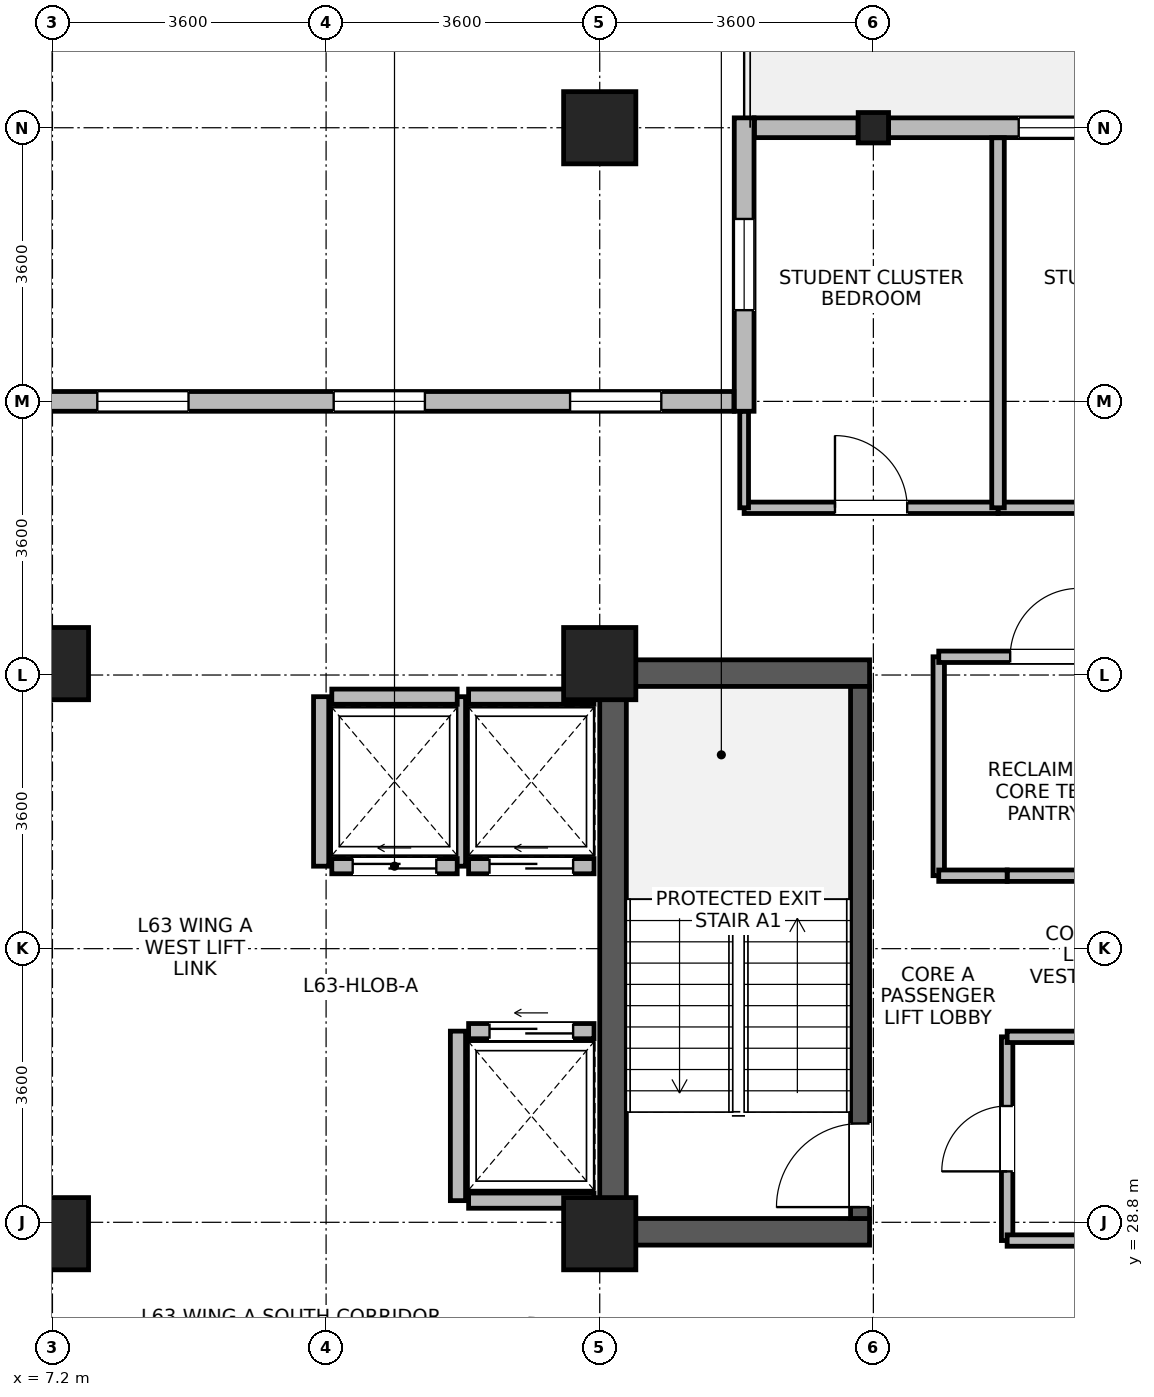
"""IFC4 building model, lengths in metres.
Left out: names, types, materials, properties, quantities, classifications, styles, units other than length and angle.
Written with IfcOpenShell. Run it as: python <this file> out.ifc"""

import sys

from ifc_helpers import new_model, si_unit, direction, frame, frame_2d, origin, origin_2d, place, context, subcontext, project, spatial, rectangle, i_section, extrude, source, transform, mapped, element, fill, save


model = new_model("IFC4")
c1 = context("Model", 3, precision=1e-05, world=origin(), true_north=direction((0.0, 1.0)))
c2 = subcontext(c1, "Body", "Model", "MODEL_VIEW")
j1 = project(units=[si_unit("LENGTHUNIT", "METRE"), si_unit("PLANEANGLEUNIT", "RADIAN")], contexts=[c1])
p1 = place(None, origin())
s1 = spatial("IfcSite", under=j1, at=p1, CompositionType="ELEMENT")
p2 = place(p1, origin())
s2 = spatial("IfcBuilding", under=s1, at=p2, CompositionType="ELEMENT")
p3 = place(p2, frame((0.0, 0.0, 246.2)))
s3 = spatial("IfcBuildingStorey", under=s2, at=p3, CompositionType="ELEMENT", Elevation=246.2)
p4 = place(p3, frame((14.575, 28.5, 0.0), z_axis=(0.0, 0.0, 1.0), x_axis=(0.0, 1.0, 0.0)))
e1 = element("IfcWall", 1, at=p4, inside=s3, PredefinedType="SHEAR", context=c2, shape_type="SweptSolid", body=[
    extrude(rectangle(XDim=7.7, YDim=0.35, at=frame_2d((3.85, 0.0))), origin(), (0.0, 0.0, 1.0), 3.28),
])
for number, where, z_axis, x_axis in (
    (2, (14.75, 28.675, 0.0), (0.0, 0.0, 1.0), (1.0, 0.0, 0.0)),
    (3, (14.75, 36.025, 0.0), (0.0, 0.0, 1.0), (1.0, 0.0, 0.0)),
):
    element("IfcWall", number, at=place(p3, frame(where, z_axis=z_axis, x_axis=x_axis)), inside=s3, PredefinedType="SHEAR", context=c2, shape_type="SweptSolid", body=[
        extrude(rectangle(XDim=3.2, YDim=0.35, at=frame_2d((1.6, 0.0))), origin(), (0.0, 0.0, 1.0), 3.28),
    ])
p5 = place(p3, frame((17.825, 28.85, 0.0), z_axis=(0.0, 0.0, 1.0), x_axis=(0.0, 1.0, 0.0)))
e4 = element("IfcWall", 4, at=p5, inside=s3, PredefinedType="SHEAR", context=c2, shape_type="SweptSolid", body=[
    extrude(rectangle(XDim=7.0, YDim=0.25, at=frame_2d((3.5, 0.0))), origin(), (0.0, 0.0, 1.0), 3.28),
])
p6 = place(p5, frame((0.15, 0.0, 0.0)))
e5 = element("IfcOpeningElement", 5, at=p6, cuts=e4, PredefinedType="OPENING", context=c2, shape_type="SweptSolid", body=[
    extrude(rectangle(XDim=1.1, YDim=2.08, at=frame_2d((0.55, 1.04))), frame((0.0, 0.135, 0.0), z_axis=(0.0, -1.0, 0.0), x_axis=(1.0, 0.0, 0.0)), (0.0, 0.0, 1.0), 0.27),
])
m1 = source(origin(), c2, "Body", "SweptSolid", [
    extrude(rectangle(XDim=0.95, YDim=0.95, at=origin_2d()), origin(), (0.0, 0.0, 1.0), 3.7),
])
for number, where, z_axis, x_axis in (
    (6, (7.2, 28.65, 0.0), (0.0, 0.0, 1.0), (1.0, 0.0, 0.0)),
    (7, (7.2, 36.15, 0.0), (0.0, 0.0, 1.0), (1.0, 0.0, 0.0)),
    (8, (14.4, 28.65, 0.0), (0.0, 0.0, 1.0), (1.0, 0.0, 0.0)),
    (9, (14.4, 36.15, 0.0), (0.0, 0.0, 1.0), (1.0, 0.0, 0.0)),
    (10, (14.4, 43.2, 0.0), (0.0, 0.0, 1.0), (1.0, 0.0, 0.0)),
):
    element("IfcColumn", number, at=place(p3, frame(where, z_axis=z_axis, x_axis=x_axis)), inside=s3, PredefinedType="COLUMN", context=c2, shape_type="MappedRepresentation", body=[
        mapped(m1, transform((0.0, 0.0, 0.0), x_axis=(1.0, 0.0, 0.0), y_axis=(0.0, 1.0, 0.0), z_axis=(0.0, 0.0, 1.0), scale=1.0)),
    ])
m2 = source(origin(), c2, "Body", "SweptSolid", [
    extrude(i_section(OverallWidth=0.399, OverallDepth=0.4, WebThickness=0.017, FlangeThickness=0.023, FilletRadius=0.015, at=origin_2d()), origin(), (0.0, 0.0, 1.0), 3.7),
])
p7 = place(p3, frame((18.0, 43.2, 0.0), z_axis=(0.0, 0.0, 1.0), x_axis=(1.0, 0.0, 0.0)))
e11 = element("IfcColumn", 11, at=p7, inside=s3, PredefinedType="COLUMN", context=c2, shape_type="MappedRepresentation", body=[
    mapped(m2, transform((0.0, 0.0, 0.0), x_axis=(1.0, 0.0, 0.0), y_axis=(0.0, 1.0, 0.0), z_axis=(0.0, 0.0, 1.0), scale=1.0)),
])
p8 = place(p3, frame((18.2, 43.2, 0.0), z_axis=(0.0, 0.0, 1.0), x_axis=(1.0, 0.0, 0.0)))
e12 = element("IfcWall", 12, at=p8, inside=s3, PredefinedType="STANDARD", context=c2, shape_type="SweptSolid", body=[
    extrude(rectangle(XDim=2.924, YDim=0.26, at=frame_2d((1.462, 0.0))), origin(), (0.0, 0.0, 1.0), 2.86),
])
p9 = place(p8, frame((1.712, 0.0, 0.85)))
e13 = element("IfcOpeningElement", 13, at=p9, cuts=e12, PredefinedType="OPENING", context=c2, shape_type="SweptSolid", body=[
    extrude(rectangle(XDim=0.95, YDim=1.75, at=frame_2d((0.475, 0.875))), frame((0.0, 0.14, 0.0), z_axis=(0.0, -1.0, 0.0), x_axis=(1.0, 0.0, 0.0)), (0.0, 0.0, 1.0), 0.28),
])
p10 = place(p3, frame((16.435, 43.2, 0.0), z_axis=(0.0, 0.0, 1.0), x_axis=(1.0, 0.0, 0.0)))
e14 = element("IfcWall", 14, at=p10, inside=s3, PredefinedType="STANDARD", context=c2, shape_type="SweptSolid", body=[
    extrude(rectangle(XDim=1.365, YDim=0.26, at=frame_2d((0.682, 0.0))), origin(), (0.0, 0.0, 1.0), 2.86),
])
p11 = place(p3, frame((16.3, 39.47, 0.0), z_axis=(0.0, 0.0, 1.0), x_axis=(0.0, 1.0, 0.0)))
e15 = element("IfcWall", 15, at=p11, inside=s3, PredefinedType="STANDARD", context=c2, shape_type="SweptSolid", body=[
    extrude(rectangle(XDim=3.86, YDim=0.26, at=frame_2d((1.93, 0.0))), origin(), (0.0, 0.0, 1.0), 3.26),
])
p12 = place(p11, frame((1.33, 0.0, 0.85)))
e16 = element("IfcOpeningElement", 16, at=p12, cuts=e15, PredefinedType="OPENING", context=c2, shape_type="SweptSolid", body=[
    extrude(rectangle(XDim=1.2, YDim=1.75, at=frame_2d((0.6, 0.875))), frame((0.0, 0.14, 0.0), z_axis=(0.0, -1.0, 0.0), x_axis=(1.0, 0.0, 0.0)), (0.0, 0.0, 1.0), 0.28),
])
p13 = place(p3, frame((6.835, 39.6, 0.0), z_axis=(0.0, 0.0, 1.0), x_axis=(1.0, 0.0, 0.0)))
e17 = element("IfcWall", 17, at=p13, inside=s3, PredefinedType="STANDARD", context=c2, shape_type="SweptSolid", body=[
    extrude(rectangle(XDim=9.33, YDim=0.26, at=frame_2d((4.665, 0.0))), origin(), (0.0, 0.0, 1.0), 3.26),
])
p14 = place(p13, frame((0.955, 0.0, 0.85)))
e18 = element("IfcOpeningElement", 18, at=p14, cuts=e17, PredefinedType="OPENING", context=c2, shape_type="SweptSolid", body=[
    extrude(rectangle(XDim=1.2, YDim=1.75, at=frame_2d((0.6, 0.875))), frame((0.0, 0.14, 0.0), z_axis=(0.0, -1.0, 0.0), x_axis=(1.0, 0.0, 0.0)), (0.0, 0.0, 1.0), 0.28),
])
p15 = place(p13, frame((4.065, 0.0, 0.85)))
e19 = element("IfcOpeningElement", 19, at=p15, cuts=e17, PredefinedType="OPENING", context=c2, shape_type="SweptSolid", body=[
    extrude(rectangle(XDim=1.2, YDim=1.75, at=frame_2d((0.6, 0.875))), frame((0.0, 0.14, 0.0), z_axis=(0.0, -1.0, 0.0), x_axis=(1.0, 0.0, 0.0)), (0.0, 0.0, 1.0), 0.28),
])
p16 = place(p13, frame((7.175, 0.0, 0.85)))
e20 = element("IfcOpeningElement", 20, at=p16, cuts=e17, PredefinedType="OPENING", context=c2, shape_type="SweptSolid", body=[
    extrude(rectangle(XDim=1.2, YDim=1.75, at=frame_2d((0.6, 0.875))), frame((0.0, 0.14, 0.0), z_axis=(0.0, -1.0, 0.0), x_axis=(1.0, 0.0, 0.0)), (0.0, 0.0, 1.0), 0.28),
])
p17 = place(p3, frame((12.675, 33.485, 0.0), z_axis=(0.0, 0.0, 1.0), x_axis=(1.0, 0.0, 0.0)))
e21 = element("IfcWall", 21, at=p17, inside=s3, PredefinedType="PARTITIONING", context=c2, shape_type="SweptSolid", body=[
    extrude(rectangle(XDim=1.65, YDim=0.2, at=frame_2d((0.825, 0.0))), origin(), (0.0, 0.0, 1.0), 3.26),
])
p18 = place(p17, frame((0.275, 0.0, 0.0)))
e22 = element("IfcOpeningElement", 22, at=p18, cuts=e21, PredefinedType="OPENING", context=c2, shape_type="SweptSolid", body=[
    extrude(rectangle(XDim=1.1, YDim=2.12, at=frame_2d((0.55, 1.06))), frame((0.0, 0.11, 0.0), z_axis=(0.0, -1.0, 0.0), x_axis=(1.0, 0.0, 0.0)), (0.0, 0.0, 1.0), 0.22),
])
p19 = place(p3, frame((12.675, 35.715, 0.0), z_axis=(0.0, 0.0, 1.0), x_axis=(1.0, 0.0, 0.0)))
e23 = element("IfcWall", 23, at=p19, inside=s3, PredefinedType="PARTITIONING", context=c2, shape_type="SweptSolid", body=[
    extrude(rectangle(XDim=1.65, YDim=0.2, at=frame_2d((0.825, 0.0))), origin(), (0.0, 0.0, 1.0), 1.46),
])
p20 = place(p3, frame((12.535, 33.485, 0.0), z_axis=(0.0, 0.0, 1.0), x_axis=(0.0, 1.0, 0.0)))
e24 = element("IfcWall", 24, at=p20, inside=s3, PredefinedType="PARTITIONING", context=c2, shape_type="SweptSolid", body=[
    extrude(rectangle(XDim=2.23, YDim=0.2, at=frame_2d((1.115, 0.0))), origin(), (0.0, 0.0, 1.0), 3.26),
])
p21 = place(p3, frame((12.675, 29.085, 0.0), z_axis=(0.0, 0.0, 1.0), x_axis=(1.0, 0.0, 0.0)))
e25 = element("IfcWall", 25, at=p21, inside=s3, PredefinedType="PARTITIONING", context=c2, shape_type="SweptSolid", body=[
    extrude(rectangle(XDim=1.65, YDim=0.2, at=frame_2d((0.825, 0.0))), origin(), (0.0, 0.0, 1.0), 1.46),
])
p22 = place(p3, frame((12.675, 31.315, 0.0), z_axis=(0.0, 0.0, 1.0), x_axis=(1.0, 0.0, 0.0)))
e26 = element("IfcWall", 26, at=p22, inside=s3, PredefinedType="PARTITIONING", context=c2, shape_type="SweptSolid", body=[
    extrude(rectangle(XDim=1.65, YDim=0.2, at=frame_2d((0.825, 0.0))), origin(), (0.0, 0.0, 1.0), 3.26),
])
p23 = place(p22, frame((0.275, 0.0, 0.0)))
e27 = element("IfcOpeningElement", 27, at=p23, cuts=e26, PredefinedType="OPENING", context=c2, shape_type="SweptSolid", body=[
    extrude(rectangle(XDim=1.1, YDim=2.12, at=frame_2d((0.55, 1.06))), frame((0.0, 0.11, 0.0), z_axis=(0.0, -1.0, 0.0), x_axis=(1.0, 0.0, 0.0)), (0.0, 0.0, 1.0), 0.22),
])
p24 = place(p3, frame((12.535, 29.085, 0.0), z_axis=(0.0, 0.0, 1.0), x_axis=(0.0, 1.0, 0.0)))
e28 = element("IfcWall", 28, at=p24, inside=s3, PredefinedType="PARTITIONING", context=c2, shape_type="SweptSolid", body=[
    extrude(rectangle(XDim=2.23, YDim=0.2, at=frame_2d((1.115, 0.0))), origin(), (0.0, 0.0, 1.0), 3.26),
])
p25 = place(p3, frame((10.875, 33.485, 0.0), z_axis=(0.0, 0.0, 1.0), x_axis=(1.0, 0.0, 0.0)))
e29 = element("IfcWall", 29, at=p25, inside=s3, PredefinedType="PARTITIONING", context=c2, shape_type="SweptSolid", body=[
    extrude(rectangle(XDim=1.65, YDim=0.2, at=frame_2d((0.825, 0.0))), origin(), (0.0, 0.0, 1.0), 3.26),
])
p26 = place(p25, frame((0.275, 0.0, 0.0)))
e30 = element("IfcOpeningElement", 30, at=p26, cuts=e29, PredefinedType="OPENING", context=c2, shape_type="SweptSolid", body=[
    extrude(rectangle(XDim=1.1, YDim=2.12, at=frame_2d((0.55, 1.06))), frame((0.0, 0.11, 0.0), z_axis=(0.0, -1.0, 0.0), x_axis=(1.0, 0.0, 0.0)), (0.0, 0.0, 1.0), 0.22),
])
p27 = place(p3, frame((10.875, 35.715, 0.0), z_axis=(0.0, 0.0, 1.0), x_axis=(1.0, 0.0, 0.0)))
e31 = element("IfcWall", 31, at=p27, inside=s3, PredefinedType="PARTITIONING", context=c2, shape_type="SweptSolid", body=[
    extrude(rectangle(XDim=1.65, YDim=0.2, at=frame_2d((0.825, 0.0))), origin(), (0.0, 0.0, 1.0), 1.46),
])
p28 = place(p3, frame((10.735, 33.485, 0.0), z_axis=(0.0, 0.0, 1.0), x_axis=(0.0, 1.0, 0.0)))
e32 = element("IfcWall", 32, at=p28, inside=s3, PredefinedType="PARTITIONING", context=c2, shape_type="SweptSolid", body=[
    extrude(rectangle(XDim=2.23, YDim=0.2, at=frame_2d((1.115, 0.0))), origin(), (0.0, 0.0, 1.0), 3.26),
])
p29 = place(p3, frame((19.64, 38.2, 0.0), z_axis=(0.0, 0.0, 1.0), x_axis=(1.0, 0.0, 0.0)))
e33 = element("IfcWall", 33, at=p29, inside=s3, PredefinedType="PARTITIONING", context=c2, shape_type="SweptSolid", body=[
    extrude(rectangle(XDim=3.62, YDim=0.15, at=frame_2d((1.81, 0.0))), origin(), (0.0, 0.0, 1.0), 3.26),
])
p30 = place(p29, frame((1.335, 0.0, 0.0)))
e34 = element("IfcOpeningElement", 34, at=p30, cuts=e33, PredefinedType="OPENING", context=c2, shape_type="SweptSolid", body=[
    extrude(rectangle(XDim=0.95, YDim=2.1, at=frame_2d((0.475, 1.05))), frame((0.0, 0.085, 0.0), z_axis=(0.0, -1.0, 0.0), x_axis=(1.0, 0.0, 0.0)), (0.0, 0.0, 1.0), 0.17),
])
p31 = place(p3, frame((16.3, 38.2, 0.0), z_axis=(0.0, 0.0, 1.0), x_axis=(1.0, 0.0, 0.0)))
e35 = element("IfcWall", 35, at=p31, inside=s3, PredefinedType="PARTITIONING", context=c2, shape_type="SweptSolid", body=[
    extrude(rectangle(XDim=3.34, YDim=0.15, at=frame_2d((1.67, 0.0))), origin(), (0.0, 0.0, 1.0), 3.26),
])
p32 = place(p31, frame((1.195, 0.0, 0.0)))
e36 = element("IfcOpeningElement", 36, at=p32, cuts=e35, PredefinedType="OPENING", context=c2, shape_type="SweptSolid", body=[
    extrude(rectangle(XDim=0.95, YDim=2.1, at=frame_2d((0.475, 1.05))), frame((0.0, 0.085, 0.0), z_axis=(0.0, -1.0, 0.0), x_axis=(1.0, 0.0, 0.0)), (0.0, 0.0, 1.0), 0.17),
])
p33 = place(p3, frame((18.86, 33.36, 0.0), z_axis=(0.0, 0.0, 1.0), x_axis=(0.0, 1.0, 0.0)))
e37 = element("IfcWall", 37, at=p33, inside=s3, PredefinedType="PARTITIONING", context=c2, shape_type="SweptSolid", body=[
    extrude(rectangle(XDim=2.88, YDim=0.15, at=frame_2d((1.44, 0.0))), origin(), (0.0, 0.0, 1.0), 3.26),
])
p34 = place(p3, frame((18.86, 36.24, 0.0), z_axis=(0.0, 0.0, 1.0), x_axis=(1.0, 0.0, 0.0)))
e38 = element("IfcWall", 38, at=p34, inside=s3, PredefinedType="PARTITIONING", context=c2, shape_type="SweptSolid", body=[
    extrude(rectangle(XDim=2.78, YDim=0.15, at=frame_2d((1.39, 0.0))), origin(), (0.0, 0.0, 1.0), 2.36),
])
p35 = place(p34, frame((0.94, 0.0, 0.0)))
e39 = element("IfcOpeningElement", 39, at=p35, cuts=e38, PredefinedType="OPENING", context=c2, shape_type="SweptSolid", body=[
    extrude(rectangle(XDim=0.9, YDim=2.08, at=frame_2d((0.45, 1.04))), frame((0.0, 0.085, 0.0), z_axis=(0.0, -1.0, 0.0), x_axis=(1.0, 0.0, 0.0)), (0.0, 0.0, 1.0), 0.17),
])
p36 = place(p3, frame((19.76, 28.56, 0.0), z_axis=(0.0, 0.0, 1.0), x_axis=(0.0, 1.0, 0.0)))
e40 = element("IfcWall", 40, at=p36, inside=s3, PredefinedType="PARTITIONING", context=c2, shape_type="SweptSolid", body=[
    extrude(rectangle(XDim=2.68, YDim=0.15, at=frame_2d((1.34, 0.0))), origin(), (0.0, 0.0, 1.0), 3.26),
])
p37 = place(p36, frame((0.91, 0.0, 0.0)))
e41 = element("IfcOpeningElement", 41, at=p37, cuts=e40, PredefinedType="OPENING", context=c2, shape_type="SweptSolid", body=[
    extrude(rectangle(XDim=0.86, YDim=2.02, at=frame_2d((0.43, 1.01))), frame((0.0, 0.085, 0.0), z_axis=(0.0, -1.0, 0.0), x_axis=(1.0, 0.0, 0.0)), (0.0, 0.0, 1.0), 0.17),
])
p38 = place(p3, frame((19.76, 28.56, 0.0), z_axis=(0.0, 0.0, 1.0), x_axis=(1.0, 0.0, 0.0)))
e42 = element("IfcWall", 42, at=p38, inside=s3, PredefinedType="PARTITIONING", context=c2, shape_type="SweptSolid", body=[
    extrude(rectangle(XDim=2.0, YDim=0.15, at=frame_2d((1.0, 0.0))), origin(), (0.0, 0.0, 1.0), 2.36),
])
p39 = place(p3, frame((19.76, 31.24, 0.0), z_axis=(0.0, 0.0, 1.0), x_axis=(1.0, 0.0, 0.0)))
e43 = element("IfcWall", 43, at=p39, inside=s3, PredefinedType="PARTITIONING", context=c2, shape_type="SweptSolid", body=[
    extrude(rectangle(XDim=2.0, YDim=0.15, at=frame_2d((1.0, 0.0))), origin(), (0.0, 0.0, 1.0), 3.26),
])
p40 = place(p3, frame((19.76, 33.36, 0.0), z_axis=(0.0, 0.0, 1.0), x_axis=(1.0, 0.0, 0.0)))
e44 = element("IfcWall", 44, at=p40, inside=s3, PredefinedType="PARTITIONING", context=c2, shape_type="SweptSolid", body=[
    extrude(rectangle(XDim=1.85, YDim=0.15, at=frame_2d((0.925, 0.0))), origin(), (0.0, 0.0, 1.0), 3.26),
])
p41 = place(p3, frame((18.86, 33.36, 0.0), z_axis=(0.0, 0.0, 1.0), x_axis=(1.0, 0.0, 0.0)))
e45 = element("IfcWall", 45, at=p41, inside=s3, PredefinedType="PARTITIONING", context=c2, shape_type="SweptSolid", body=[
    extrude(rectangle(XDim=0.9, YDim=0.15, at=frame_2d((0.45, 0.0))), origin(), (0.0, 0.0, 1.0), 3.26),
])
p42 = place(p3, frame((16.3, 38.2, 0.0), z_axis=(0.0, 0.0, 1.0), x_axis=(0.0, 1.0, 0.0)))
e46 = element("IfcWall", 46, at=p42, inside=s3, PredefinedType="PARTITIONING", context=c2, shape_type="SweptSolid", body=[
    extrude(rectangle(XDim=1.268, YDim=0.115, at=frame_2d((0.634, 0.0))), origin(), (0.0, 0.0, 1.0), 3.26),
])
p43 = place(p3, frame((19.64, 38.2, 0.0), z_axis=(0.0, 0.0, 1.0), x_axis=(0.0, 1.0, 0.0)))
e47 = element("IfcWall", 47, at=p43, inside=s3, PredefinedType="PARTITIONING", context=c2, shape_type="SweptSolid", body=[
    extrude(rectangle(XDim=4.868, YDim=0.165, at=frame_2d((2.434, 0.0))), origin(), (0.0, 0.0, 1.0), 3.26),
])
p44 = place(p9, origin())
e48 = element("IfcWindow", 48, at=p44, inside=s3, PartitioningType="SINGLE_PANEL", PredefinedType="WINDOW", context=c2, shape_type="SweptSolid", body=[
    extrude(rectangle(XDim=0.95, YDim=1.75, at=frame_2d((0.475, 0.875))), frame((0.0, 0.03, 0.0), z_axis=(0.0, -1.0, 0.0), x_axis=(1.0, 0.0, 0.0)), (0.0, 0.0, 1.0), 0.06),
])
fill(e13, e48)
p45 = place(p12, origin())
e49 = element("IfcWindow", 49, at=p45, inside=s3, PartitioningType="SINGLE_PANEL", PredefinedType="WINDOW", context=c2, shape_type="SweptSolid", body=[
    extrude(rectangle(XDim=1.2, YDim=1.75, at=frame_2d((0.6, 0.875))), frame((0.0, 0.03, 0.0), z_axis=(0.0, -1.0, 0.0), x_axis=(1.0, 0.0, 0.0)), (0.0, 0.0, 1.0), 0.06),
])
fill(e16, e49)
p46 = place(p14, origin())
e50 = element("IfcWindow", 50, at=p46, inside=s3, PartitioningType="SINGLE_PANEL", PredefinedType="WINDOW", context=c2, shape_type="SweptSolid", body=[
    extrude(rectangle(XDim=1.2, YDim=1.75, at=frame_2d((0.6, 0.875))), frame((0.0, 0.03, 0.0), z_axis=(0.0, -1.0, 0.0), x_axis=(1.0, 0.0, 0.0)), (0.0, 0.0, 1.0), 0.06),
])
fill(e18, e50)
p47 = place(p15, origin())
e51 = element("IfcWindow", 51, at=p47, inside=s3, PartitioningType="SINGLE_PANEL", PredefinedType="WINDOW", context=c2, shape_type="SweptSolid", body=[
    extrude(rectangle(XDim=1.2, YDim=1.75, at=frame_2d((0.6, 0.875))), frame((0.0, 0.03, 0.0), z_axis=(0.0, -1.0, 0.0), x_axis=(1.0, 0.0, 0.0)), (0.0, 0.0, 1.0), 0.06),
])
fill(e19, e51)
p48 = place(p16, origin())
e52 = element("IfcWindow", 52, at=p48, inside=s3, PartitioningType="SINGLE_PANEL", PredefinedType="WINDOW", context=c2, shape_type="SweptSolid", body=[
    extrude(rectangle(XDim=1.2, YDim=1.75, at=frame_2d((0.6, 0.875))), frame((0.0, 0.03, 0.0), z_axis=(0.0, -1.0, 0.0), x_axis=(1.0, 0.0, 0.0)), (0.0, 0.0, 1.0), 0.06),
])
fill(e20, e52)
p49 = place(p6, origin())
e53 = element("IfcDoor", 53, at=p49, inside=s3, OperationType="SINGLE_SWING_LEFT", PredefinedType="DOOR", context=c2, shape_type="SweptSolid", body=[
    extrude(rectangle(XDim=1.1, YDim=2.08, at=frame_2d((0.55, 1.04))), frame((0.0, 0.025, 0.0), z_axis=(0.0, -1.0, 0.0), x_axis=(1.0, 0.0, 0.0)), (0.0, 0.0, 1.0), 0.05),
])
fill(e5, e53)
p50 = place(p18, origin())
e54 = element("IfcDoor", 54, at=p50, inside=s3, OperationType="SLIDING_TO_LEFT", PredefinedType="DOOR", context=c2, shape_type="SweptSolid", body=[
    extrude(rectangle(XDim=1.1, YDim=2.12, at=frame_2d((0.55, 1.06))), frame((0.0, 0.025, 0.0), z_axis=(0.0, -1.0, 0.0), x_axis=(1.0, 0.0, 0.0)), (0.0, 0.0, 1.0), 0.05),
])
fill(e22, e54)
p51 = place(p23, origin())
e55 = element("IfcDoor", 55, at=p51, inside=s3, OperationType="SLIDING_TO_LEFT", PredefinedType="DOOR", context=c2, shape_type="SweptSolid", body=[
    extrude(rectangle(XDim=1.1, YDim=2.12, at=frame_2d((0.55, 1.06))), frame((0.0, 0.025, 0.0), z_axis=(0.0, -1.0, 0.0), x_axis=(1.0, 0.0, 0.0)), (0.0, 0.0, 1.0), 0.05),
])
fill(e27, e55)
p52 = place(p26, origin())
e56 = element("IfcDoor", 56, at=p52, inside=s3, OperationType="SLIDING_TO_LEFT", PredefinedType="DOOR", context=c2, shape_type="SweptSolid", body=[
    extrude(rectangle(XDim=1.1, YDim=2.12, at=frame_2d((0.55, 1.06))), frame((0.0, 0.025, 0.0), z_axis=(0.0, -1.0, 0.0), x_axis=(1.0, 0.0, 0.0)), (0.0, 0.0, 1.0), 0.05),
])
fill(e30, e56)
p53 = place(p32, origin())
e57 = element("IfcDoor", 57, at=p53, inside=s3, OperationType="SINGLE_SWING_LEFT", PredefinedType="DOOR", context=c2, shape_type="SweptSolid", body=[
    extrude(rectangle(XDim=0.95, YDim=2.1, at=frame_2d((0.475, 1.05))), frame((0.0, 0.025, 0.0), z_axis=(0.0, -1.0, 0.0), x_axis=(1.0, 0.0, 0.0)), (0.0, 0.0, 1.0), 0.05),
])
fill(e36, e57)
p54 = place(p35, origin())
e58 = element("IfcDoor", 58, at=p54, inside=s3, OperationType="SINGLE_SWING_RIGHT", PredefinedType="DOOR", context=c2, shape_type="SweptSolid", body=[
    extrude(rectangle(XDim=0.9, YDim=2.08, at=frame_2d((0.45, 1.04))), frame((0.0, 0.025, 0.0), z_axis=(0.0, -1.0, 0.0), x_axis=(1.0, 0.0, 0.0)), (0.0, 0.0, 1.0), 0.05),
])
fill(e39, e58)
p55 = place(p37, origin())
e59 = element("IfcDoor", 59, at=p55, inside=s3, OperationType="SINGLE_SWING_LEFT", PredefinedType="DOOR", context=c2, shape_type="SweptSolid", body=[
    extrude(rectangle(XDim=0.86, YDim=2.02, at=frame_2d((0.43, 1.01))), frame((0.0, 0.025, 0.0), z_axis=(0.0, -1.0, 0.0), x_axis=(1.0, 0.0, 0.0)), (0.0, 0.0, 1.0), 0.05),
])
fill(e41, e59)
save(model, sys.argv[1])
